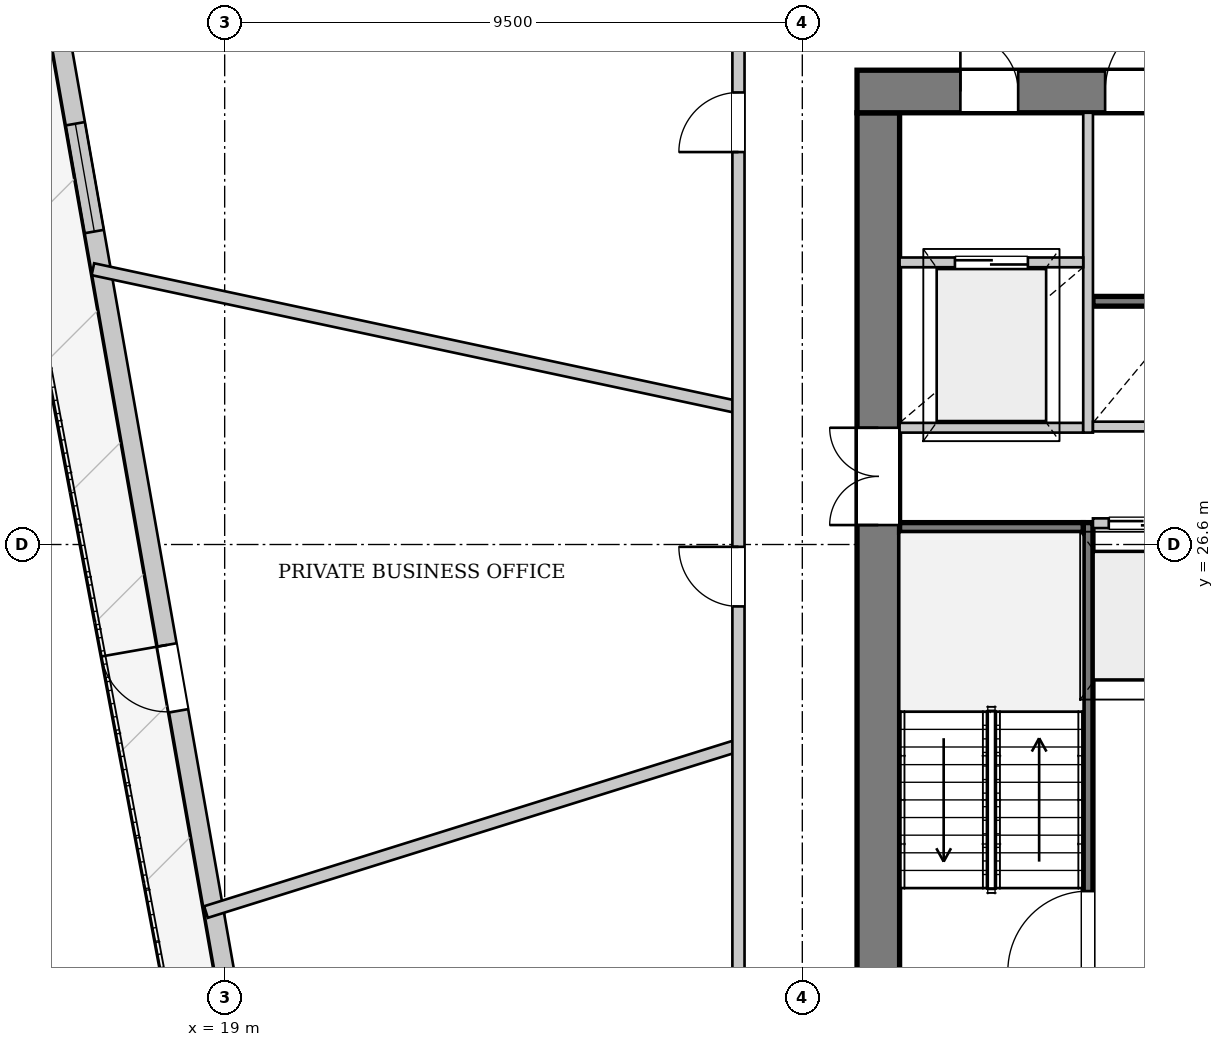
"""IFC4 building model, lengths in metres.
Left out: names, types, materials, properties, quantities, classifications, styles, units other than length and angle.
Written with IfcOpenShell. Run it as: python <this file> out.ifc"""

import sys

from ifc_helpers import new_model, si_unit, direction, frame, frame_2d, origin, place, context, subcontext, project, spatial, rectangle, extrude, source, transform, mapped, element, fill, save


model = new_model("IFC4")
c1 = context("Model", 3, precision=1e-05, world=origin(), true_north=direction((0.0, 1.0)))
c2 = subcontext(c1, "Body", "Model", "MODEL_VIEW")
j1 = project(units=[si_unit("LENGTHUNIT", "METRE"), si_unit("PLANEANGLEUNIT", "RADIAN")], contexts=[c1])
p1 = place(None, origin())
s1 = spatial("IfcSite", under=j1, at=p1, CompositionType="ELEMENT")
p2 = place(p1, origin())
s2 = spatial("IfcBuilding", under=s1, at=p2, CompositionType="ELEMENT")
p3 = place(p2, frame((0.0, 0.0, 127.0)))
s3 = spatial("IfcBuildingStorey", under=s2, at=p3, CompositionType="ELEMENT", Elevation=127.0)
p4 = place(p3, frame((19.15, 18.702, 0.0), z_axis=(0.0, 0.0, 1.0), x_axis=(-0.173250549445, 0.984877782832, 0.0)))
e1 = element("IfcWall", 1, at=p4, inside=s3, PredefinedType="SOLIDWALL", context=c2, shape_type="SweptSolid", body=[
    extrude(rectangle(XDim=18.101, YDim=0.32, at=frame_2d((9.05, 0.0))), origin(), (0.0, 0.0, 1.0), 2.692),
])
p5 = place(p4, frame((5.242, 0.0, 0.0)))
e2 = element("IfcOpeningElement", 2, at=p5, cuts=e1, PredefinedType="OPENING", context=c2, shape_type="SweptSolid", body=[
    extrude(rectangle(XDim=1.1, YDim=2.3, at=frame_2d((0.55, 1.15))), frame((0.0, 0.17, 0.0), z_axis=(0.0, -1.0, 0.0), x_axis=(1.0, 0.0, 0.0)), (0.0, 0.0, 1.0), 0.34),
])
p6 = place(p4, frame((13.245, 0.0, 0.372)))
e3 = element("IfcOpeningElement", 3, at=p6, cuts=e1, PredefinedType="OPENING", context=c2, shape_type="SweptSolid", body=[
    extrude(rectangle(XDim=1.8, YDim=2.2, at=frame_2d((0.9, 1.1))), frame((0.0, 0.17, 0.0), z_axis=(0.0, -1.0, 0.0), x_axis=(1.0, 0.0, 0.0)), (0.0, 0.0, 1.0), 0.34),
])
p7 = place(p3, frame((29.75, 19.5, 0.0), z_axis=(0.0, 0.0, 1.0), x_axis=(0.0, 1.0, 0.0)))
e4 = element("IfcWall", 4, at=p7, inside=s3, PredefinedType="SHEAR", context=c2, shape_type="SweptSolid", body=[
    extrude(rectangle(XDim=14.2, YDim=0.7, at=frame_2d((7.1, 0.0))), origin(), (0.0, 0.0, 1.0), 3.3),
])
p8 = place(p7, frame((7.42, 0.0, 0.0)))
e5 = element("IfcOpeningElement", 5, at=p8, cuts=e4, PredefinedType="OPENING", context=c2, shape_type="SweptSolid", body=[
    extrude(rectangle(XDim=1.6, YDim=2.2, at=frame_2d((0.8, 1.1))), frame((0.0, 0.36, 0.0), z_axis=(0.0, -1.0, 0.0), x_axis=(1.0, 0.0, 0.0)), (0.0, 0.0, 1.0), 0.72),
])
p9 = place(p3, frame((29.4, 34.05, 0.0), z_axis=(0.0, 0.0, 1.0), x_axis=(1.0, 0.0, 0.0)))
e6 = element("IfcWall", 6, at=p9, inside=s3, PredefinedType="SHEAR", context=c2, shape_type="SweptSolid", body=[
    extrude(rectangle(XDim=17.2, YDim=0.7, at=frame_2d((8.6, 0.0))), origin(), (0.0, 0.0, 1.0), 3.3),
])
p10 = place(p9, frame((1.7, 0.0, 0.0)))
e7 = element("IfcOpeningElement", 7, at=p10, cuts=e6, PredefinedType="OPENING", context=c2, shape_type="SweptSolid", body=[
    extrude(rectangle(XDim=0.95, YDim=2.1, at=frame_2d((0.475, 1.05))), frame((0.0, 0.36, 0.0), z_axis=(0.0, -1.0, 0.0), x_axis=(1.0, 0.0, 0.0)), (0.0, 0.0, 1.0), 0.72),
])
p11 = place(p9, frame((4.08, 0.0, 0.0)))
e8 = element("IfcOpeningElement", 8, at=p11, cuts=e6, PredefinedType="OPENING", context=c2, shape_type="SweptSolid", body=[
    extrude(rectangle(XDim=1.32, YDim=2.2, at=frame_2d((0.66, 1.1))), frame((0.0, 0.36, 0.0), z_axis=(0.0, -1.0, 0.0), x_axis=(1.0, 0.0, 0.0)), (0.0, 0.0, 1.0), 0.72),
])
p12 = place(p9, frame((15.15, 0.0, 0.0)))
e9 = element("IfcOpeningElement", 9, at=p12, cuts=e6, PredefinedType="OPENING", context=c2, shape_type="SweptSolid", body=[
    extrude(rectangle(XDim=0.95, YDim=2.1, at=frame_2d((0.475, 1.05))), frame((0.0, 0.36, 0.0), z_axis=(0.0, -1.0, 0.0), x_axis=(1.0, 0.0, 0.0)), (0.0, 0.0, 1.0), 0.72),
])
p13 = place(p3, frame((33.2, 19.5, 0.0), z_axis=(0.0, 0.0, 1.0), x_axis=(0.0, 1.0, 0.0)))
e10 = element("IfcWall", 10, at=p13, inside=s3, PredefinedType="PARTITIONING", context=c2, shape_type="SweptSolid", body=[
    extrude(rectangle(XDim=7.46, YDim=0.16, at=frame_2d((3.73, 0.0))), origin(), (0.0, 0.0, 1.0), 3.3),
])
p14 = place(p13, frame((0.08, 0.0, 0.0)))
e11 = element("IfcOpeningElement", 11, at=p14, cuts=e10, PredefinedType="OPENING", context=c2, shape_type="SweptSolid", body=[
    extrude(rectangle(XDim=1.32, YDim=2.2, at=frame_2d((0.66, 1.1))), frame((0.0, 0.09, 0.0), z_axis=(0.0, -1.0, 0.0), x_axis=(1.0, 0.0, 0.0)), (0.0, 0.0, 1.0), 0.18),
])
p15 = place(p3, frame((30.1, 26.88, 0.0), z_axis=(0.0, 0.0, 1.0), x_axis=(1.0, 0.0, 0.0)))
e12 = element("IfcWall", 12, at=p15, inside=s3, PredefinedType="PARTITIONING", context=c2, shape_type="SweptSolid", body=[
    extrude(rectangle(XDim=3.02, YDim=0.16, at=frame_2d((1.51, 0.0))), origin(), (0.0, 0.0, 1.0), 3.3),
])
p16 = place(p3, frame((33.28, 30.6, 0.0), z_axis=(0.0, 0.0, 1.0), x_axis=(1.0, 0.0, 0.0)))
e13 = element("IfcWall", 13, at=p16, inside=s3, PredefinedType="PARTITIONING", context=c2, shape_type="SweptSolid", body=[
    extrude(rectangle(XDim=7.3, YDim=0.16, at=frame_2d((3.65, 0.0))), origin(), (0.0, 0.0, 1.0), 3.3),
])
p17 = place(p3, frame((33.28, 24.49, 0.0), z_axis=(0.0, 0.0, 1.0), x_axis=(1.0, 0.0, 0.0)))
e14 = element("IfcWall", 14, at=p17, inside=s3, PredefinedType="PARTITIONING", context=c2, shape_type="SweptSolid", body=[
    extrude(rectangle(XDim=9.44, YDim=0.16, at=frame_2d((4.72, 0.0))), origin(), (0.0, 0.0, 1.0), 3.3),
])
p18 = place(p3, frame((30.1, 28.52, 0.0), z_axis=(0.0, 0.0, 1.0), x_axis=(1.0, 0.0, 0.0)))
e15 = element("IfcWall", 15, at=p18, inside=s3, PredefinedType="PARTITIONING", context=c2, shape_type="SweptSolid", body=[
    extrude(rectangle(XDim=3.02, YDim=0.16, at=frame_2d((1.51, 0.0))), origin(), (0.0, 0.0, 1.0), 3.3),
])
p19 = place(p3, frame((33.2, 28.44, 0.0), z_axis=(0.0, 0.0, 1.0), x_axis=(0.0, 1.0, 0.0)))
e16 = element("IfcWall", 16, at=p19, inside=s3, PredefinedType="PARTITIONING", context=c2, shape_type="SweptSolid", body=[
    extrude(rectangle(XDim=5.26, YDim=0.16, at=frame_2d((2.63, 0.0))), origin(), (0.0, 0.0, 1.0), 3.3),
])
p20 = place(p3, frame((30.1, 31.24, 0.0), z_axis=(0.0, 0.0, 1.0), x_axis=(1.0, 0.0, 0.0)))
e17 = element("IfcWall", 17, at=p20, inside=s3, PredefinedType="PARTITIONING", context=c2, shape_type="SweptSolid", body=[
    extrude(rectangle(XDim=3.02, YDim=0.16, at=frame_2d((1.51, 0.0))), origin(), (0.0, 0.0, 1.0), 3.3),
])
p21 = place(p20, frame((0.91, 0.0, 0.0)))
e18 = element("IfcOpeningElement", 18, at=p21, cuts=e17, PredefinedType="OPENING", context=c2, shape_type="SweptSolid", body=[
    extrude(rectangle(XDim=1.2, YDim=2.2, at=frame_2d((0.6, 1.1))), frame((0.0, 0.09, 0.0), z_axis=(0.0, -1.0, 0.0), x_axis=(1.0, 0.0, 0.0)), (0.0, 0.0, 1.0), 0.18),
])
p22 = place(p3, frame((33.28, 26.95, 0.0), z_axis=(0.0, 0.0, 1.0), x_axis=(1.0, 0.0, 0.0)))
e19 = element("IfcWall", 19, at=p22, inside=s3, PredefinedType="PARTITIONING", context=c2, shape_type="SweptSolid", body=[
    extrude(rectangle(XDim=9.44, YDim=0.16, at=frame_2d((4.72, 0.0))), origin(), (0.0, 0.0, 1.0), 3.3),
])
p23 = place(p22, frame((0.26, 0.0, 0.0)))
e20 = element("IfcOpeningElement", 20, at=p23, cuts=e19, PredefinedType="OPENING", context=c2, shape_type="SweptSolid", body=[
    extrude(rectangle(XDim=1.1, YDim=2.2, at=frame_2d((0.55, 1.1))), frame((0.0, 0.09, 0.0), z_axis=(0.0, -1.0, 0.0), x_axis=(1.0, 0.0, 0.0)), (0.0, 0.0, 1.0), 0.18),
])
p24 = place(p22, frame((2.01, 0.0, 0.0)))
e21 = element("IfcOpeningElement", 21, at=p24, cuts=e19, PredefinedType="OPENING", context=c2, shape_type="SweptSolid", body=[
    extrude(rectangle(XDim=1.1, YDim=2.2, at=frame_2d((0.55, 1.1))), frame((0.0, 0.09, 0.0), z_axis=(0.0, -1.0, 0.0), x_axis=(1.0, 0.0, 0.0)), (0.0, 0.0, 1.0), 0.18),
])
p25 = place(p22, frame((3.76, 0.0, 0.0)))
e22 = element("IfcOpeningElement", 22, at=p25, cuts=e19, PredefinedType="OPENING", context=c2, shape_type="SweptSolid", body=[
    extrude(rectangle(XDim=1.1, YDim=2.2, at=frame_2d((0.55, 1.1))), frame((0.0, 0.09, 0.0), z_axis=(0.0, -1.0, 0.0), x_axis=(1.0, 0.0, 0.0)), (0.0, 0.0, 1.0), 0.18),
])
p26 = place(p22, frame((5.51, 0.0, 0.0)))
e23 = element("IfcOpeningElement", 23, at=p26, cuts=e19, PredefinedType="OPENING", context=c2, shape_type="SweptSolid", body=[
    extrude(rectangle(XDim=1.1, YDim=2.2, at=frame_2d((0.55, 1.1))), frame((0.0, 0.09, 0.0), z_axis=(0.0, -1.0, 0.0), x_axis=(1.0, 0.0, 0.0)), (0.0, 0.0, 1.0), 0.18),
])
p27 = place(p3, frame((33.28, 28.54, 0.0), z_axis=(0.0, 0.0, 1.0), x_axis=(1.0, 0.0, 0.0)))
e24 = element("IfcWall", 24, at=p27, inside=s3, PredefinedType="PARTITIONING", context=c2, shape_type="SweptSolid", body=[
    extrude(rectangle(XDim=12.62, YDim=0.16, at=frame_2d((6.31, 0.0))), origin(), (0.0, 0.0, 1.0), 3.3),
])
p28 = place(p3, frame((27.45, 28.856, 0.0), z_axis=(0.0, 0.0, 1.0), x_axis=(-0.977884605694, 0.209145159988, 0.0)))
e25 = element("IfcWall", 25, at=p28, inside=s3, PredefinedType="PARTITIONING", context=c2, shape_type="SweptSolid", body=[
    extrude(rectangle(XDim=10.857, YDim=0.2, at=frame_2d((5.429, 0.0))), origin(), (0.0, 0.0, 1.0), 3.3),
])
p29 = place(p3, frame((27.45, 23.298, 0.0), z_axis=(0.0, 0.0, 1.0), x_axis=(-0.954328374734, -0.298759691354, 0.0)))
e26 = element("IfcWall", 26, at=p29, inside=s3, PredefinedType="PARTITIONING", context=c2, shape_type="SweptSolid", body=[
    extrude(rectangle(XDim=9.177, YDim=0.2, at=frame_2d((4.588, 0.0))), origin(), (0.0, 0.0, 1.0), 3.3),
])
p30 = place(p3, frame((27.45, 16.85, 0.0), z_axis=(0.0, 0.0, 1.0), x_axis=(0.0, 1.0, 0.0)))
e27 = element("IfcWall", 27, at=p30, inside=s3, PredefinedType="PARTITIONING", context=c2, shape_type="SweptSolid", body=[
    extrude(rectangle(XDim=19.5, YDim=0.2, at=frame_2d((9.75, 0.0))), origin(), (0.0, 0.0, 1.0), 3.3),
])
p31 = place(p30, frame((16.204, 0.0, 0.0)))
e28 = element("IfcOpeningElement", 28, at=p31, cuts=e27, PredefinedType="OPENING", context=c2, shape_type="SweptSolid", body=[
    extrude(rectangle(XDim=0.98, YDim=2.15, at=frame_2d((0.49, 1.075))), frame((0.0, 0.11, 0.0), z_axis=(0.0, -1.0, 0.0), x_axis=(1.0, 0.0, 0.0)), (0.0, 0.0, 1.0), 0.22),
])
p32 = place(p30, frame((8.732, 0.0, 0.0)))
e29 = element("IfcOpeningElement", 29, at=p32, cuts=e27, PredefinedType="OPENING", context=c2, shape_type="SweptSolid", body=[
    extrude(rectangle(XDim=0.98, YDim=2.15, at=frame_2d((0.49, 1.075))), frame((0.0, 0.11, 0.0), z_axis=(0.0, -1.0, 0.0), x_axis=(1.0, 0.0, 0.0)), (0.0, 0.0, 1.0), 0.22),
])
p33 = place(p30, frame((0.485, 0.0, 0.0)))
e30 = element("IfcOpeningElement", 30, at=p33, cuts=e27, PredefinedType="OPENING", context=c2, shape_type="SweptSolid", body=[
    extrude(rectangle(XDim=0.98, YDim=2.15, at=frame_2d((0.49, 1.075))), frame((0.0, 0.11, 0.0), z_axis=(0.0, -1.0, 0.0), x_axis=(1.0, 0.0, 0.0)), (0.0, 0.0, 1.0), 0.22),
])
m1 = source(origin(), c2, "Body", "SweptSolid", [
    extrude(rectangle(XDim=1.1, YDim=2.3, at=frame_2d((0.55, 1.15))), frame((0.0, 0.025, 0.0), z_axis=(0.0, -1.0, 0.0), x_axis=(1.0, 0.0, 0.0)), (0.0, 0.0, 1.0), 0.05),
])
p34 = place(p5, origin())
e31 = element("IfcDoor", 31, at=p34, inside=s3, OperationType="SINGLE_SWING_RIGHT", PredefinedType="DOOR", context=c2, shape_type="MappedRepresentation", body=[
    mapped(m1, transform((0.0, 0.0, 0.0), x_axis=(1.0, 0.0, 0.0), y_axis=(0.0, 1.0, 0.0), z_axis=(0.0, 0.0, 1.0), scale=1.0)),
])
fill(e2, e31)
m2 = source(origin(), c2, "Body", "SweptSolid", [
    extrude(rectangle(XDim=1.8, YDim=2.2, at=frame_2d((0.9, 1.1))), frame((0.0, 0.03, 0.0), z_axis=(0.0, -1.0, 0.0), x_axis=(1.0, 0.0, 0.0)), (0.0, 0.0, 1.0), 0.06),
])
p35 = place(p6, origin())
e32 = element("IfcWindow", 32, at=p35, inside=s3, PartitioningType="SINGLE_PANEL", PredefinedType="WINDOW", context=c2, shape_type="MappedRepresentation", body=[
    mapped(m2, transform((0.0, 0.0, 0.0), x_axis=(1.0, 0.0, 0.0), y_axis=(0.0, 1.0, 0.0), z_axis=(0.0, 0.0, 1.0), scale=1.0)),
])
fill(e3, e32)
m3 = source(origin(), c2, "Body", "SweptSolid", [
    extrude(rectangle(XDim=1.6, YDim=2.2, at=frame_2d((0.8, 1.1))), frame((0.0, 0.025, 0.0), z_axis=(0.0, -1.0, 0.0), x_axis=(1.0, 0.0, 0.0)), (0.0, 0.0, 1.0), 0.05),
])
p36 = place(p8, origin())
e33 = element("IfcDoor", 33, at=p36, inside=s3, OperationType="DOUBLE_DOOR_SINGLE_SWING", PredefinedType="DOOR", context=c2, shape_type="MappedRepresentation", body=[
    mapped(m3, transform((0.0, 0.0, 0.0), x_axis=(1.0, 0.0, 0.0), y_axis=(0.0, 1.0, 0.0), z_axis=(0.0, 0.0, 1.0), scale=1.0)),
])
fill(e5, e33)
m4 = source(origin(), c2, "Body", "SweptSolid", [
    extrude(rectangle(XDim=0.95, YDim=2.1, at=frame_2d((0.475, 1.05))), frame((0.0, 0.025, 0.0), z_axis=(0.0, -1.0, 0.0), x_axis=(1.0, 0.0, 0.0)), (0.0, 0.0, 1.0), 0.05),
])
p37 = place(p10, origin())
e34 = element("IfcDoor", 34, at=p37, inside=s3, OperationType="SINGLE_SWING_LEFT", PredefinedType="DOOR", context=c2, shape_type="MappedRepresentation", body=[
    mapped(m4, transform((0.0, 0.0, 0.0), x_axis=(1.0, 0.0, 0.0), y_axis=(0.0, 1.0, 0.0), z_axis=(0.0, 0.0, 1.0), scale=1.0)),
])
fill(e7, e34)
m5 = source(origin(), c2, "Body", "SweptSolid", [
    extrude(rectangle(XDim=1.32, YDim=2.2, at=frame_2d((0.66, 1.1))), frame((0.0, 0.025, 0.0), z_axis=(0.0, -1.0, 0.0), x_axis=(1.0, 0.0, 0.0)), (0.0, 0.0, 1.0), 0.05),
])
p38 = place(p11, origin())
e35 = element("IfcDoor", 35, at=p38, inside=s3, OperationType="SINGLE_SWING_RIGHT", PredefinedType="DOOR", context=c2, shape_type="MappedRepresentation", body=[
    mapped(m5, transform((0.0, 0.0, 0.0), x_axis=(1.0, 0.0, 0.0), y_axis=(0.0, 1.0, 0.0), z_axis=(0.0, 0.0, 1.0), scale=1.0)),
])
fill(e8, e35)
p39 = place(p14, origin())
e36 = element("IfcDoor", 36, at=p39, inside=s3, OperationType="SINGLE_SWING_LEFT", PredefinedType="DOOR", context=c2, shape_type="MappedRepresentation", body=[
    mapped(m5, transform((0.0, 0.0, 0.0), x_axis=(1.0, 0.0, 0.0), y_axis=(0.0, 1.0, 0.0), z_axis=(0.0, 0.0, 1.0), scale=1.0)),
])
fill(e11, e36)
m6 = source(origin(), c2, "Body", "SweptSolid", [
    extrude(rectangle(XDim=1.2, YDim=2.2, at=frame_2d((0.6, 1.1))), frame((0.0, 0.025, 0.0), z_axis=(0.0, -1.0, 0.0), x_axis=(1.0, 0.0, 0.0)), (0.0, 0.0, 1.0), 0.05),
])
p40 = place(p21, origin())
e37 = element("IfcDoor", 37, at=p40, inside=s3, OperationType="DOUBLE_DOOR_SLIDING", PredefinedType="DOOR", context=c2, shape_type="MappedRepresentation", body=[
    mapped(m6, transform((0.0, 0.0, 0.0), x_axis=(1.0, 0.0, 0.0), y_axis=(0.0, 1.0, 0.0), z_axis=(0.0, 0.0, 1.0), scale=1.0)),
])
fill(e18, e37)
m7 = source(origin(), c2, "Body", "SweptSolid", [
    extrude(rectangle(XDim=1.1, YDim=2.2, at=frame_2d((0.55, 1.1))), frame((0.0, 0.025, 0.0), z_axis=(0.0, -1.0, 0.0), x_axis=(1.0, 0.0, 0.0)), (0.0, 0.0, 1.0), 0.05),
])
p41 = place(p23, origin())
e38 = element("IfcDoor", 38, at=p41, inside=s3, OperationType="DOUBLE_DOOR_SLIDING", PredefinedType="DOOR", context=c2, shape_type="MappedRepresentation", body=[
    mapped(m7, transform((0.0, 0.0, 0.0), x_axis=(1.0, 0.0, 0.0), y_axis=(0.0, 1.0, 0.0), z_axis=(0.0, 0.0, 1.0), scale=1.0)),
])
fill(e20, e38)
m8 = source(origin(), c2, "Body", "SweptSolid", [
    extrude(rectangle(XDim=0.98, YDim=2.15, at=frame_2d((0.49, 1.075))), frame((0.0, 0.025, 0.0), z_axis=(0.0, -1.0, 0.0), x_axis=(1.0, 0.0, 0.0)), (0.0, 0.0, 1.0), 0.05),
])
p42 = place(p31, origin())
e39 = element("IfcDoor", 39, at=p42, inside=s3, OperationType="SINGLE_SWING_LEFT", PredefinedType="DOOR", context=c2, shape_type="MappedRepresentation", body=[
    mapped(m8, transform((0.0, 0.0, 0.0), x_axis=(1.0, 0.0, 0.0), y_axis=(0.0, 1.0, 0.0), z_axis=(0.0, 0.0, 1.0), scale=1.0)),
])
fill(e28, e39)
p43 = place(p32, origin())
e40 = element("IfcDoor", 40, at=p43, inside=s3, OperationType="SINGLE_SWING_RIGHT", PredefinedType="DOOR", context=c2, shape_type="MappedRepresentation", body=[
    mapped(m8, transform((0.0, 0.0, 0.0), x_axis=(1.0, 0.0, 0.0), y_axis=(0.0, 1.0, 0.0), z_axis=(0.0, 0.0, 1.0), scale=1.0)),
])
fill(e29, e40)
save(model, sys.argv[1])
